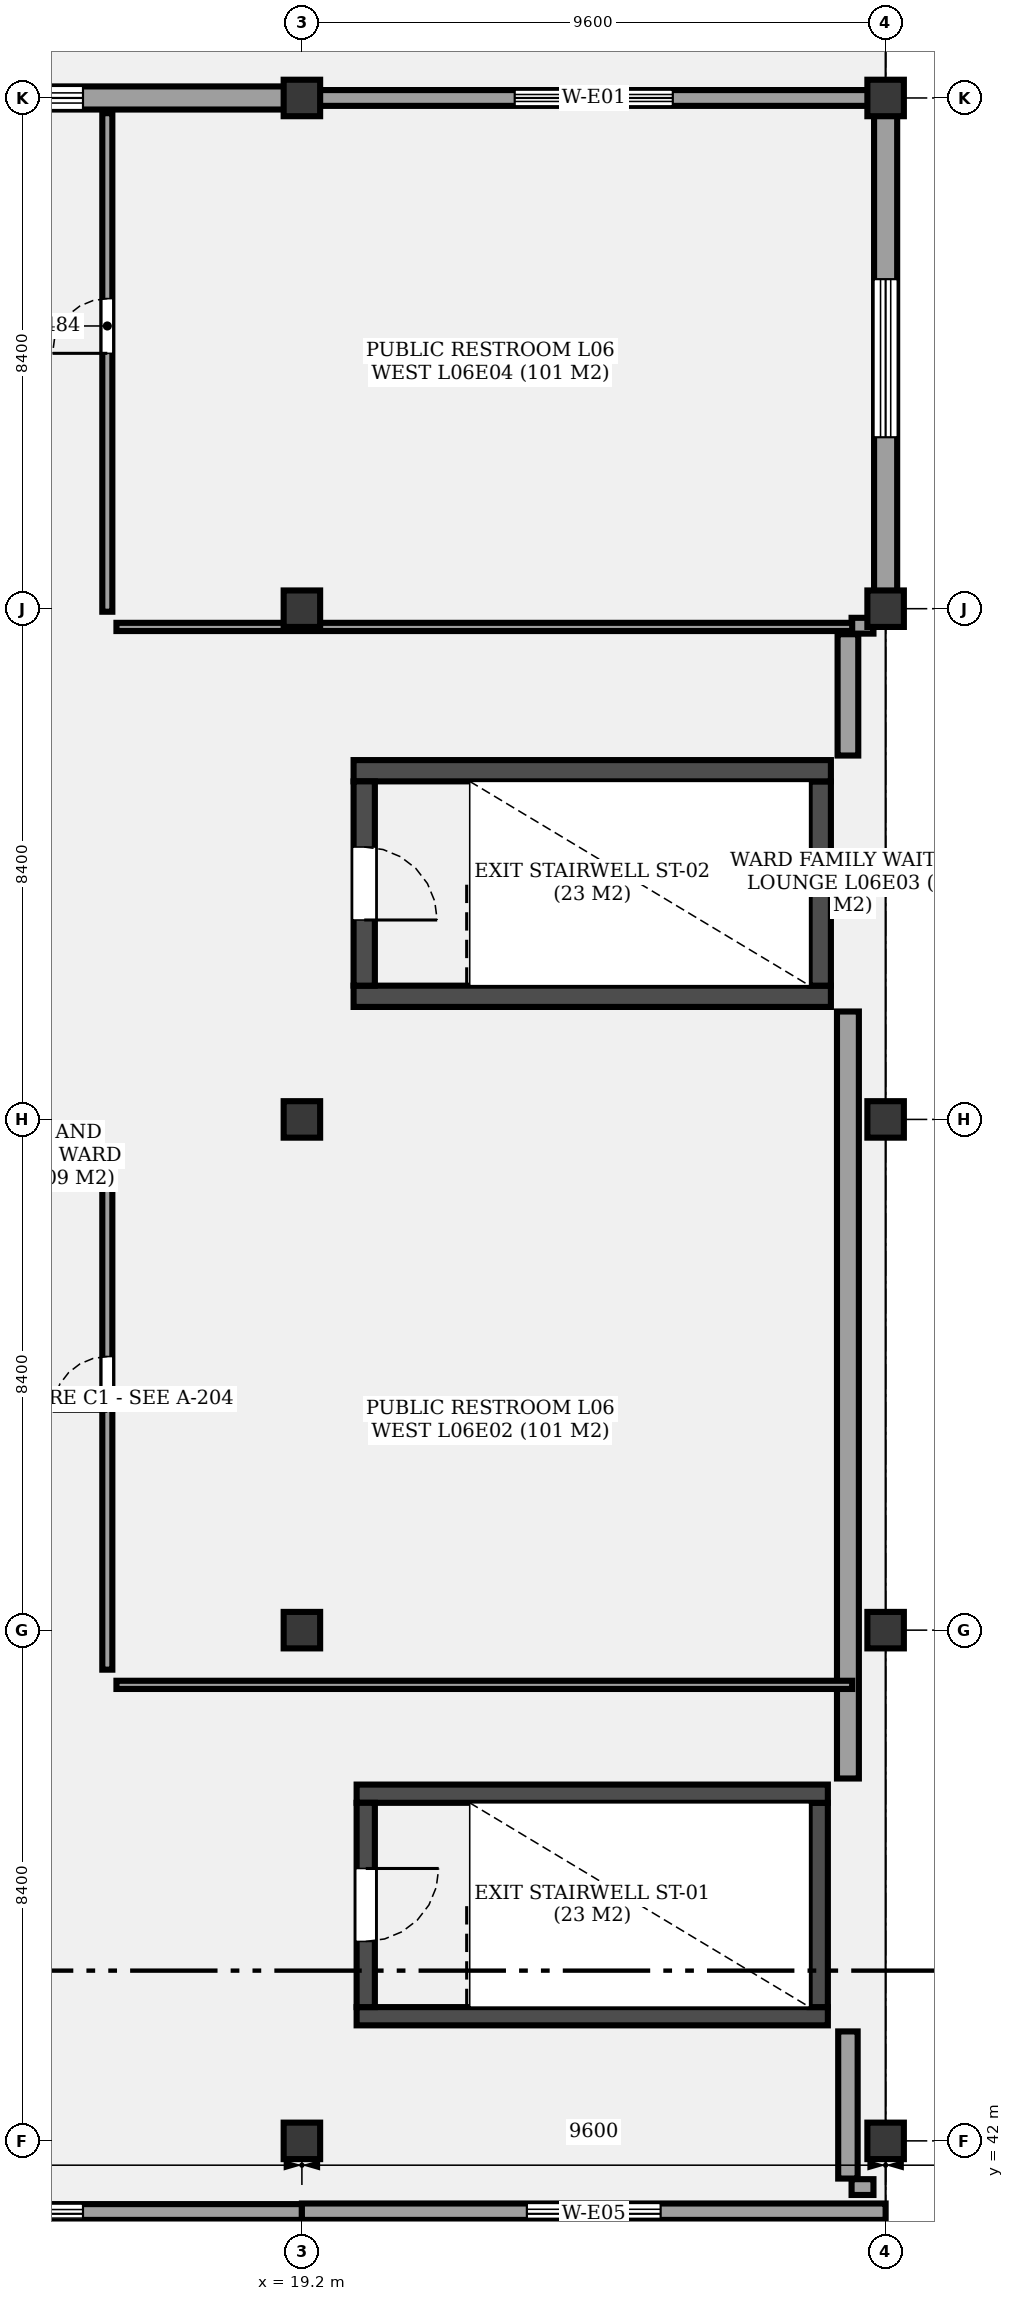
"""IFC4 building model, lengths in metres.
Left out: names, types, materials, properties, quantities, classifications, styles, units other than length and angle.
Written with IfcOpenShell. Run it as: python <this file> out.ifc"""

import sys

from ifc_helpers import new_model, si_unit, direction, frame, frame_2d, origin, origin_2d, place, context, subcontext, project, spatial, rectangle, extrude, element, fill, save


model = new_model("IFC4")
c1 = context("Model", 3, precision=1e-05, world=origin(), true_north=direction((0.0, 1.0)))
c2 = subcontext(c1, "Body", "Model", "MODEL_VIEW")
j1 = project(units=[si_unit("LENGTHUNIT", "METRE"), si_unit("PLANEANGLEUNIT", "RADIAN")], contexts=[c1])
p1 = place(None, origin())
s1 = spatial("IfcSite", under=j1, at=p1, CompositionType="ELEMENT")
p2 = place(p1, origin())
s2 = spatial("IfcBuilding", under=s1, at=p2, CompositionType="ELEMENT")
p3 = place(p2, frame((0.0, 0.0, 26.2)))
s3 = spatial("IfcBuildingStorey", under=s2, at=p3, CompositionType="ELEMENT", Elevation=26.2)
for number, where, z_axis, x_axis in (
    (1, (19.2, 42.0, 0.0), (0.0, 0.0, 1.0), (1.0, 0.0, 0.0)),
    (2, (19.2, 50.4, 0.0), (0.0, 0.0, 1.0), (1.0, 0.0, 0.0)),
    (3, (19.2, 58.8, 0.0), (0.0, 0.0, 1.0), (1.0, 0.0, 0.0)),
    (4, (19.2, 67.2, 0.0), (0.0, 0.0, 1.0), (1.0, 0.0, 0.0)),
    (5, (19.2, 75.6, 0.0), (0.0, 0.0, 1.0), (1.0, 0.0, 0.0)),
    (6, (28.8, 42.0, 0.0), (0.0, 0.0, 1.0), (1.0, 0.0, 0.0)),
    (7, (28.8, 50.4, 0.0), (0.0, 0.0, 1.0), (1.0, 0.0, 0.0)),
    (8, (28.8, 58.8, 0.0), (0.0, 0.0, 1.0), (1.0, 0.0, 0.0)),
    (9, (28.8, 67.2, 0.0), (0.0, 0.0, 1.0), (1.0, 0.0, 0.0)),
    (10, (28.8, 75.6, 0.0), (0.0, 0.0, 1.0), (1.0, 0.0, 0.0)),
):
    element("IfcColumn", number, at=place(p3, frame(where, z_axis=z_axis, x_axis=x_axis)), inside=s3, PredefinedType="COLUMN", context=c2, shape_type="SweptSolid", body=[
        extrude(rectangle(XDim=0.6, YDim=0.6, at=origin_2d()), origin(), (0.0, 0.0, 1.0), 4.2),
    ])
p4 = place(p3, frame((20.1, 44.05, 0.0), z_axis=(0.0, 0.0, 1.0), x_axis=(1.0, 0.0, 0.0)))
e11 = element("IfcWall", 11, at=p4, inside=s3, PredefinedType="SHEAR", context=c2, shape_type="SweptSolid", body=[
    extrude(rectangle(XDim=7.75, YDim=0.3, at=frame_2d((3.875, 0.0))), origin(), (0.0, 0.0, 1.0), 4.2),
])
p5 = place(p3, frame((27.7, 44.2, 0.0), z_axis=(0.0, 0.0, 1.0), x_axis=(0.0, 1.0, 0.0)))
e12 = element("IfcWall", 12, at=p5, inside=s3, PredefinedType="SHEAR", context=c2, shape_type="SweptSolid", body=[
    extrude(rectangle(XDim=3.36, YDim=0.3, at=frame_2d((1.68, 0.0))), origin(), (0.0, 0.0, 1.0), 4.2),
])
p6 = place(p3, frame((27.85, 47.71, 0.0), z_axis=(0.0, 0.0, 1.0), x_axis=(-1.0, 0.0, 0.0)))
e13 = element("IfcWall", 13, at=p6, inside=s3, PredefinedType="SHEAR", context=c2, shape_type="SweptSolid", body=[
    extrude(rectangle(XDim=7.75, YDim=0.3, at=frame_2d((3.875, 0.0))), origin(), (0.0, 0.0, 1.0), 4.2),
])
p7 = place(p3, frame((20.25, 47.56, 0.0), z_axis=(0.0, 0.0, 1.0), x_axis=(0.0, -1.0, 0.0)))
e14 = element("IfcWall", 14, at=p7, inside=s3, PredefinedType="SHEAR", context=c2, shape_type="SweptSolid", body=[
    extrude(rectangle(XDim=3.36, YDim=0.3, at=frame_2d((1.68, 0.0))), origin(), (0.0, 0.0, 1.0), 4.2),
])
p8 = place(p7, frame((1.08, 0.0, 0.0)))
e15 = element("IfcOpeningElement", 15, at=p8, cuts=e14, PredefinedType="OPENING", context=c2, shape_type="SweptSolid", body=[
    extrude(rectangle(XDim=1.2, YDim=2.2, at=frame_2d((0.6, 1.1))), frame((0.0, 0.16, 0.0), z_axis=(0.0, -1.0, 0.0), x_axis=(1.0, 0.0, 0.0)), (0.0, 0.0, 1.0), 0.32),
])
p9 = place(p3, frame((20.05, 60.825, 0.0), z_axis=(0.0, 0.0, 1.0), x_axis=(1.0, 0.0, 0.0)))
e16 = element("IfcWall", 16, at=p9, inside=s3, PredefinedType="SHEAR", context=c2, shape_type="SweptSolid", body=[
    extrude(rectangle(XDim=7.85, YDim=0.35, at=frame_2d((3.925, 0.0))), origin(), (0.0, 0.0, 1.0), 4.2),
])
p10 = place(p3, frame((27.725, 61.0, 0.0), z_axis=(0.0, 0.0, 1.0), x_axis=(0.0, 1.0, 0.0)))
e17 = element("IfcWall", 17, at=p10, inside=s3, PredefinedType="SHEAR", context=c2, shape_type="SweptSolid", body=[
    extrude(rectangle(XDim=3.36, YDim=0.35, at=frame_2d((1.68, 0.0))), origin(), (0.0, 0.0, 1.0), 4.2),
])
p11 = place(p3, frame((27.9, 64.535, 0.0), z_axis=(0.0, 0.0, 1.0), x_axis=(-1.0, 0.0, 0.0)))
e18 = element("IfcWall", 18, at=p11, inside=s3, PredefinedType="SHEAR", context=c2, shape_type="SweptSolid", body=[
    extrude(rectangle(XDim=7.85, YDim=0.35, at=frame_2d((3.925, 0.0))), origin(), (0.0, 0.0, 1.0), 4.2),
])
p12 = place(p3, frame((20.225, 64.36, 0.0), z_axis=(0.0, 0.0, 1.0), x_axis=(0.0, -1.0, 0.0)))
e19 = element("IfcWall", 19, at=p12, inside=s3, PredefinedType="SHEAR", context=c2, shape_type="SweptSolid", body=[
    extrude(rectangle(XDim=3.36, YDim=0.35, at=frame_2d((1.68, 0.0))), origin(), (0.0, 0.0, 1.0), 4.2),
])
p13 = place(p12, frame((1.08, 0.0, 0.0)))
e20 = element("IfcOpeningElement", 20, at=p13, cuts=e19, PredefinedType="OPENING", context=c2, shape_type="SweptSolid", body=[
    extrude(rectangle(XDim=1.2, YDim=2.2, at=frame_2d((0.6, 1.1))), frame((0.0, 0.185, 0.0), z_axis=(0.0, -1.0, 0.0), x_axis=(1.0, 0.0, 0.0)), (0.0, 0.0, 1.0), 0.37),
])
p14 = place(p3, frame((19.2, 40.8, 0.0), z_axis=(0.0, 0.0, 1.0), x_axis=(-1.0, 0.0, 0.0)))
e21 = element("IfcWall", 21, at=p14, inside=s3, PredefinedType="SOLIDWALL", context=c2, shape_type="SweptSolid", body=[
    extrude(rectangle(XDim=9.6, YDim=0.32, at=frame_2d((4.8, 0.0))), origin(), (0.0, 0.0, 1.0), 3.39),
])
p15 = place(p14, frame((3.6, 0.0, 0.85)))
e22 = element("IfcOpeningElement", 22, at=p15, cuts=e21, PredefinedType="OPENING", context=c2, shape_type="SweptSolid", body=[
    extrude(rectangle(XDim=2.4, YDim=1.4, at=frame_2d((1.2, 0.7))), frame((0.0, 0.17, 0.0), z_axis=(0.0, -1.0, 0.0), x_axis=(1.0, 0.0, 0.0)), (0.0, 0.0, 1.0), 0.34),
])
p16 = place(p3, frame((28.8, 40.8, 0.0), z_axis=(0.0, 0.0, 1.0), x_axis=(-1.0, 0.0, 0.0)))
e23 = element("IfcWall", 23, at=p16, inside=s3, PredefinedType="SOLIDWALL", context=c2, shape_type="SweptSolid", body=[
    extrude(rectangle(XDim=9.6, YDim=0.34, at=frame_2d((4.8, 0.0))), origin(), (0.0, 0.0, 1.0), 3.39),
])
p17 = place(p16, frame((3.7, 0.0, 0.85)))
e24 = element("IfcOpeningElement", 24, at=p17, cuts=e23, PredefinedType="OPENING", context=c2, shape_type="SweptSolid", body=[
    extrude(rectangle(XDim=2.2, YDim=1.4, at=frame_2d((1.1, 0.7))), frame((0.0, 0.18, 0.0), z_axis=(0.0, -1.0, 0.0), x_axis=(1.0, 0.0, 0.0)), (0.0, 0.0, 1.0), 0.36),
])
p18 = place(p3, frame((9.6, 75.6, 0.0), z_axis=(0.0, 0.0, 1.0), x_axis=(1.0, 0.0, 0.0)))
e25 = element("IfcWall", 25, at=p18, inside=s3, PredefinedType="SOLIDWALL", context=c2, shape_type="SweptSolid", body=[
    extrude(rectangle(XDim=9.6, YDim=0.38, at=frame_2d((4.8, 0.0))), origin(), (0.0, 0.0, 1.0), 3.39),
])
p19 = place(p18, frame((3.6, 0.0, 0.85)))
e26 = element("IfcOpeningElement", 26, at=p19, cuts=e25, PredefinedType="OPENING", context=c2, shape_type="SweptSolid", body=[
    extrude(rectangle(XDim=2.4, YDim=1.4, at=frame_2d((1.2, 0.7))), frame((0.0, 0.2, 0.0), z_axis=(0.0, -1.0, 0.0), x_axis=(1.0, 0.0, 0.0)), (0.0, 0.0, 1.0), 0.4),
])
p20 = place(p3, frame((19.2, 75.6, 0.0), z_axis=(0.0, 0.0, 1.0), x_axis=(1.0, 0.0, 0.0)))
e27 = element("IfcWall", 27, at=p20, inside=s3, PredefinedType="SOLIDWALL", context=c2, shape_type="SweptSolid", body=[
    extrude(rectangle(XDim=9.6, YDim=0.26, at=frame_2d((4.8, 0.0))), origin(), (0.0, 0.0, 1.0), 3.39),
])
p21 = place(p20, frame((3.5, 0.0, 0.85)))
e28 = element("IfcOpeningElement", 28, at=p21, cuts=e27, PredefinedType="OPENING", context=c2, shape_type="SweptSolid", body=[
    extrude(rectangle(XDim=2.6, YDim=1.4, at=frame_2d((1.3, 0.7))), frame((0.0, 0.14, 0.0), z_axis=(0.0, -1.0, 0.0), x_axis=(1.0, 0.0, 0.0)), (0.0, 0.0, 1.0), 0.28),
])
for number, where, z_axis, x_axis in (
    (29, (28.6, 66.92, 0.0), (0.0, 0.0, 1.0), (-1.0, 0.0, 0.0)),
    (30, (28.6, 41.24, 0.0), (0.0, 0.0, 1.0), (-1.0, 0.0, 0.0)),
):
    element("IfcWall", number, at=place(p3, frame(where, z_axis=z_axis, x_axis=x_axis)), inside=s3, PredefinedType="SOLIDWALL", context=c2, shape_type="SweptSolid", body=[
        extrude(rectangle(XDim=0.36, YDim=0.26, at=frame_2d((0.18, 0.0))), origin(), (0.0, 0.0, 1.0), 3.39),
    ])
p22 = place(p3, frame((28.18, 43.8, 0.0), z_axis=(0.0, 0.0, 1.0), x_axis=(0.0, -1.0, 0.0)))
e31 = element("IfcWall", 31, at=p22, inside=s3, PredefinedType="SOLIDWALL", context=c2, shape_type="SweptSolid", body=[
    extrude(rectangle(XDim=2.42, YDim=0.32, at=frame_2d((1.21, 0.0))), origin(), (0.0, 0.0, 1.0), 3.39),
])
p23 = place(p3, frame((28.18, 66.78, 0.0), z_axis=(0.0, 0.0, 1.0), x_axis=(0.0, -1.0, 0.0)))
e32 = element("IfcWall", 32, at=p23, inside=s3, PredefinedType="SOLIDWALL", context=c2, shape_type="SweptSolid", body=[
    extrude(rectangle(XDim=1.995, YDim=0.34, at=frame_2d((0.998, 0.0))), origin(), (0.0, 0.0, 1.0), 3.39),
])
p24 = place(p3, frame((28.18, 60.575, 0.0), z_axis=(0.0, 0.0, 1.0), x_axis=(0.0, -1.0, 0.0)))
e33 = element("IfcWall", 33, at=p24, inside=s3, PredefinedType="SOLIDWALL", context=c2, shape_type="SweptSolid", body=[
    extrude(rectangle(XDim=12.615, YDim=0.36, at=frame_2d((6.308, 0.0))), origin(), (0.0, 0.0, 1.0), 3.39),
])
p25 = place(p3, frame((28.8, 75.44, 0.0), z_axis=(0.0, 0.0, 1.0), x_axis=(0.0, -1.0, 0.0)))
e34 = element("IfcWall", 34, at=p25, inside=s3, PredefinedType="SOLIDWALL", context=c2, shape_type="SweptSolid", body=[
    extrude(rectangle(XDim=8.24, YDim=0.38, at=frame_2d((4.12, 0.0))), origin(), (0.0, 0.0, 1.0), 3.39),
])
p26 = place(p25, frame((2.82, 0.0, 0.85)))
e35 = element("IfcOpeningElement", 35, at=p26, cuts=e34, PredefinedType="OPENING", context=c2, shape_type="SweptSolid", body=[
    extrude(rectangle(XDim=2.6, YDim=1.4, at=frame_2d((1.3, 0.7))), frame((0.0, 0.2, 0.0), z_axis=(0.0, -1.0, 0.0), x_axis=(1.0, 0.0, 0.0)), (0.0, 0.0, 1.0), 0.4),
])
p27 = place(p3, frame((16.0, 49.75, 0.0), z_axis=(0.0, 0.0, 1.0), x_axis=(0.0, 1.0, 0.0)))
e36 = element("IfcWall", 36, at=p27, inside=s3, PredefinedType="PARTITIONING", context=c2, shape_type="SweptSolid", body=[
    extrude(rectangle(XDim=8.2, YDim=0.165, at=frame_2d((4.1, 0.0))), origin(), (0.0, 0.0, 1.0), 3.3),
])
p28 = place(p27, frame((4.25, 0.0, 0.0)))
e37 = element("IfcOpeningElement", 37, at=p28, cuts=e36, PredefinedType="OPENING", context=c2, shape_type="SweptSolid", body=[
    extrude(rectangle(XDim=0.9, YDim=2.1, at=frame_2d((0.45, 1.05))), frame((0.0, 0.093, 0.0), z_axis=(0.0, -1.0, 0.0), x_axis=(1.0, 0.0, 0.0)), (0.0, 0.0, 1.0), 0.185),
])
p29 = place(p3, frame((16.15, 49.5, 0.0), z_axis=(0.0, 0.0, 1.0), x_axis=(1.0, 0.0, 0.0)))
e38 = element("IfcWall", 38, at=p29, inside=s3, PredefinedType="PARTITIONING", context=c2, shape_type="SweptSolid", body=[
    extrude(rectangle(XDim=12.1, YDim=0.135, at=frame_2d((6.05, 0.0))), origin(), (0.0, 0.0, 1.0), 3.3),
])
p30 = place(p3, frame((16.0, 67.15, 0.0), z_axis=(0.0, 0.0, 1.0), x_axis=(0.0, 1.0, 0.0)))
e39 = element("IfcWall", 39, at=p30, inside=s3, PredefinedType="PARTITIONING", context=c2, shape_type="SweptSolid", body=[
    extrude(rectangle(XDim=8.2, YDim=0.165, at=frame_2d((4.1, 0.0))), origin(), (0.0, 0.0, 1.0), 3.3),
])
p31 = place(p30, frame((4.25, 0.0, 0.0)))
e40 = element("IfcOpeningElement", 40, at=p31, cuts=e39, PredefinedType="OPENING", context=c2, shape_type="SweptSolid", body=[
    extrude(rectangle(XDim=0.9, YDim=2.1, at=frame_2d((0.45, 1.05))), frame((0.0, 0.093, 0.0), z_axis=(0.0, -1.0, 0.0), x_axis=(1.0, 0.0, 0.0)), (0.0, 0.0, 1.0), 0.185),
])
p32 = place(p3, frame((16.15, 66.9, 0.0), z_axis=(0.0, 0.0, 1.0), x_axis=(1.0, 0.0, 0.0)))
e41 = element("IfcWall", 41, at=p32, inside=s3, PredefinedType="PARTITIONING", context=c2, shape_type="SweptSolid", body=[
    extrude(rectangle(XDim=12.1, YDim=0.135, at=frame_2d((6.05, 0.0))), origin(), (0.0, 0.0, 1.0), 3.3),
])
p33 = place(p8, origin())
e42 = element("IfcDoor", 42, at=p33, inside=s3, OperationType="SINGLE_SWING_LEFT", PredefinedType="DOOR", context=c2, shape_type="SweptSolid", body=[
    extrude(rectangle(XDim=1.2, YDim=2.2, at=frame_2d((0.6, 1.1))), frame((0.0, 0.025, 0.0), z_axis=(0.0, -1.0, 0.0), x_axis=(1.0, 0.0, 0.0)), (0.0, 0.0, 1.0), 0.05),
])
fill(e15, e42)
p34 = place(p13, origin())
e43 = element("IfcDoor", 43, at=p34, inside=s3, OperationType="SINGLE_SWING_RIGHT", PredefinedType="DOOR", context=c2, shape_type="SweptSolid", body=[
    extrude(rectangle(XDim=1.2, YDim=2.2, at=frame_2d((0.6, 1.1))), frame((0.0, 0.025, 0.0), z_axis=(0.0, -1.0, 0.0), x_axis=(1.0, 0.0, 0.0)), (0.0, 0.0, 1.0), 0.05),
])
fill(e20, e43)
p35 = place(p15, origin())
e44 = element("IfcWindow", 44, at=p35, inside=s3, PartitioningType="SINGLE_PANEL", PredefinedType="WINDOW", context=c2, shape_type="SweptSolid", body=[
    extrude(rectangle(XDim=2.4, YDim=1.4, at=frame_2d((1.2, 0.7))), frame((0.0, 0.03, 0.0), z_axis=(0.0, -1.0, 0.0), x_axis=(1.0, 0.0, 0.0)), (0.0, 0.0, 1.0), 0.06),
])
fill(e22, e44)
p36 = place(p17, origin())
e45 = element("IfcWindow", 45, at=p36, inside=s3, PartitioningType="SINGLE_PANEL", PredefinedType="WINDOW", context=c2, shape_type="SweptSolid", body=[
    extrude(rectangle(XDim=2.2, YDim=1.4, at=frame_2d((1.1, 0.7))), frame((0.0, 0.03, 0.0), z_axis=(0.0, -1.0, 0.0), x_axis=(1.0, 0.0, 0.0)), (0.0, 0.0, 1.0), 0.06),
])
fill(e24, e45)
p37 = place(p19, origin())
e46 = element("IfcWindow", 46, at=p37, inside=s3, PartitioningType="SINGLE_PANEL", PredefinedType="WINDOW", context=c2, shape_type="SweptSolid", body=[
    extrude(rectangle(XDim=2.4, YDim=1.4, at=frame_2d((1.2, 0.7))), frame((0.0, 0.03, 0.0), z_axis=(0.0, -1.0, 0.0), x_axis=(1.0, 0.0, 0.0)), (0.0, 0.0, 1.0), 0.06),
])
fill(e26, e46)
p38 = place(p21, origin())
e47 = element("IfcWindow", 47, at=p38, inside=s3, PartitioningType="SINGLE_PANEL", PredefinedType="WINDOW", context=c2, shape_type="SweptSolid", body=[
    extrude(rectangle(XDim=2.6, YDim=1.4, at=frame_2d((1.3, 0.7))), frame((0.0, 0.03, 0.0), z_axis=(0.0, -1.0, 0.0), x_axis=(1.0, 0.0, 0.0)), (0.0, 0.0, 1.0), 0.06),
])
fill(e28, e47)
p39 = place(p26, origin())
e48 = element("IfcWindow", 48, at=p39, inside=s3, PartitioningType="SINGLE_PANEL", PredefinedType="WINDOW", context=c2, shape_type="SweptSolid", body=[
    extrude(rectangle(XDim=2.6, YDim=1.4, at=frame_2d((1.3, 0.7))), frame((0.0, 0.03, 0.0), z_axis=(0.0, -1.0, 0.0), x_axis=(1.0, 0.0, 0.0)), (0.0, 0.0, 1.0), 0.06),
])
fill(e35, e48)
p40 = place(p28, origin())
e49 = element("IfcDoor", 49, at=p40, inside=s3, OperationType="SINGLE_SWING_LEFT", PredefinedType="DOOR", context=c2, shape_type="SweptSolid", body=[
    extrude(rectangle(XDim=0.9, YDim=2.1, at=frame_2d((0.45, 1.05))), frame((0.0, 0.025, 0.0), z_axis=(0.0, -1.0, 0.0), x_axis=(1.0, 0.0, 0.0)), (0.0, 0.0, 1.0), 0.05),
])
fill(e37, e49)
p41 = place(p31, origin())
e50 = element("IfcDoor", 50, at=p41, inside=s3, OperationType="SINGLE_SWING_LEFT", PredefinedType="DOOR", context=c2, shape_type="SweptSolid", body=[
    extrude(rectangle(XDim=0.9, YDim=2.1, at=frame_2d((0.45, 1.05))), frame((0.0, 0.025, 0.0), z_axis=(0.0, -1.0, 0.0), x_axis=(1.0, 0.0, 0.0)), (0.0, 0.0, 1.0), 0.05),
])
fill(e40, e50)
save(model, sys.argv[1])
